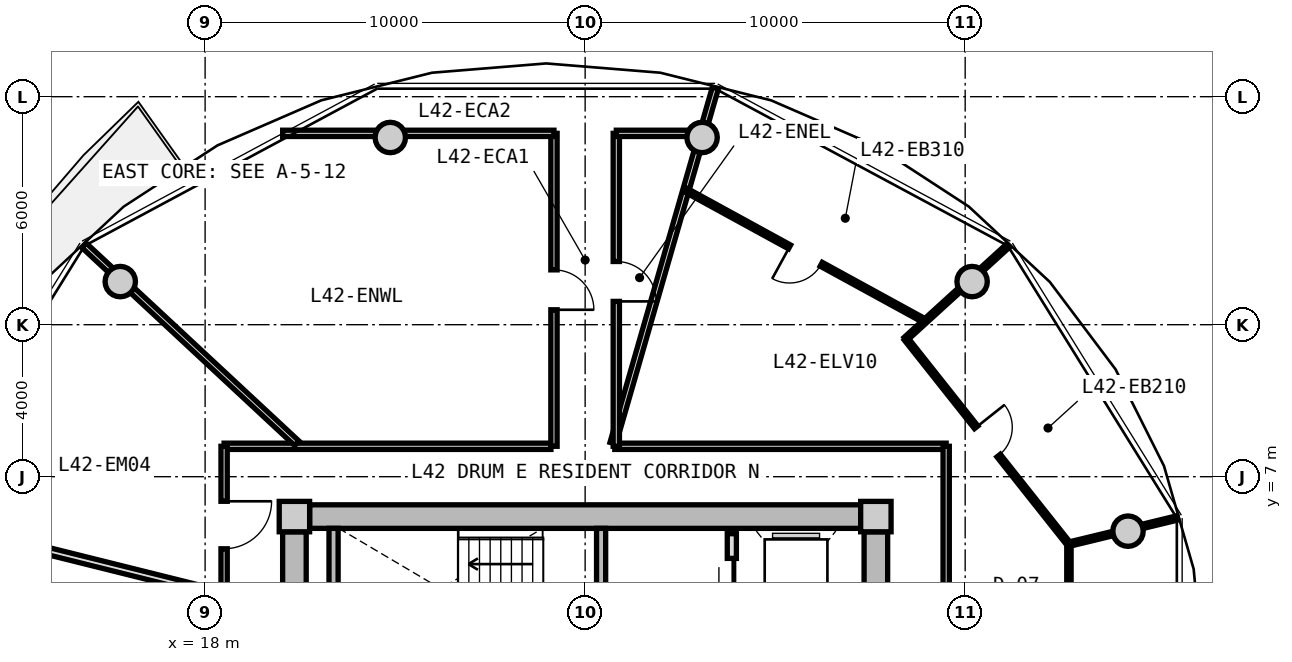
"""IFC4 building model, lengths in metres.
Left out: names, types, materials, properties, quantities, classifications, styles, units other than length and angle.
Written with IfcOpenShell. Run it as: python <this file> out.ifc"""

import sys

from ifc_helpers import new_model, si_unit, direction, frame, frame_2d, origin, origin_2d, place, context, subcontext, project, spatial, rectangle, circle, extrude, source, transform, mapped, element, fill, save


model = new_model("IFC4")
c1 = context("Model", 3, precision=1e-05, world=origin(), true_north=direction((0.0, 1.0)))
c2 = subcontext(c1, "Body", "Model", "MODEL_VIEW")
j1 = project(units=[si_unit("LENGTHUNIT", "METRE"), si_unit("PLANEANGLEUNIT", "RADIAN")], contexts=[c1])
p1 = place(None, origin())
s1 = spatial("IfcSite", under=j1, at=p1, CompositionType="ELEMENT")
p2 = place(p1, origin())
s2 = spatial("IfcBuilding", under=s1, at=p2, CompositionType="ELEMENT")
p3 = place(p2, frame((0.0, 0.0, 137.35)))
s3 = spatial("IfcBuildingStorey", under=s2, at=p3, CompositionType="ELEMENT", Elevation=137.35)
m1 = source(origin(), c2, "Body", "SweptSolid", [
    extrude(rectangle(XDim=0.8, YDim=0.8, at=origin_2d()), origin(), (0.0, 0.0, 1.0), 3.05),
])
for number, where, z_axis, x_axis in (
    (1, (35.65, 5.95, 0.0), (0.0, 0.0, 1.0), (1.0, 0.0, 0.0)),
    (2, (20.35, 5.95, 0.0), (0.0, 0.0, 1.0), (1.0, 0.0, 0.0)),
):
    element("IfcColumn", number, at=place(p3, frame(where, z_axis=z_axis, x_axis=x_axis)), inside=s3, PredefinedType="COLUMN", context=c2, shape_type="MappedRepresentation", body=[
        mapped(m1, transform((0.0, 0.0, 0.0), x_axis=(1.0, 0.0, 0.0), y_axis=(0.0, 1.0, 0.0), z_axis=(0.0, 0.0, 1.0), scale=1.0)),
    ])
m2 = source(origin(), c2, "Body", "SweptSolid", [
    extrude(rectangle(XDim=14.5, YDim=0.62, at=frame_2d((7.25, 0.0))), origin(), (0.0, 0.0, 1.0), 2.81),
])
p4 = place(p3, frame((20.75, 5.95, 0.0), z_axis=(0.0, 0.0, 1.0), x_axis=(1.0, 0.0, 0.0)))
e3 = element("IfcWall", 3, at=p4, inside=s3, PredefinedType="SHEAR", context=c2, shape_type="MappedRepresentation", body=[
    mapped(m2, transform((0.0, 0.0, 0.0), x_axis=(1.0, 0.0, 0.0), y_axis=(0.0, 1.0, 0.0), z_axis=(0.0, 0.0, 1.0), scale=1.0)),
])
m3 = source(origin(), c2, "Body", "SweptSolid", [
    extrude(rectangle(XDim=11.1, YDim=0.62, at=frame_2d((5.55, 0.0))), origin(), (0.0, 0.0, 1.0), 2.81),
])
p5 = place(p3, frame((20.35, -5.55, 0.0), z_axis=(0.0, 0.0, 1.0), x_axis=(0.0, 1.0, 0.0)))
e4 = element("IfcWall", 4, at=p5, inside=s3, PredefinedType="SHEAR", context=c2, shape_type="MappedRepresentation", body=[
    mapped(m3, transform((0.0, 0.0, 0.0), x_axis=(1.0, 0.0, 0.0), y_axis=(0.0, 1.0, 0.0), z_axis=(0.0, 0.0, 1.0), scale=1.0)),
])
p6 = place(p5, frame((3.8, 0.0, 0.0)))
e5 = element("IfcOpeningElement", 5, at=p6, cuts=e4, PredefinedType="OPENING", context=c2, shape_type="SweptSolid", body=[
    extrude(rectangle(XDim=1.2, YDim=2.15, at=frame_2d((0.6, 1.075))), frame((0.0, 0.32, 0.0), z_axis=(0.0, -1.0, 0.0), x_axis=(1.0, 0.0, 0.0)), (0.0, 0.0, 1.0), 0.64),
])
p7 = place(p3, frame((35.65, 5.55, 0.0), z_axis=(0.0, 0.0, 1.0), x_axis=(0.0, -1.0, 0.0)))
e6 = element("IfcWall", 6, at=p7, inside=s3, PredefinedType="SHEAR", context=c2, shape_type="MappedRepresentation", body=[
    mapped(m3, transform((0.0, 0.0, 0.0), x_axis=(1.0, 0.0, 0.0), y_axis=(0.0, 1.0, 0.0), z_axis=(0.0, 0.0, 1.0), scale=1.0)),
])
p8 = place(p7, frame((5.65, 0.0, 0.0)))
e7 = element("IfcOpeningElement", 7, at=p8, cuts=e6, PredefinedType="OPENING", context=c2, shape_type="SweptSolid", body=[
    extrude(rectangle(XDim=1.2, YDim=2.15, at=frame_2d((0.6, 1.075))), frame((0.0, 0.32, 0.0), z_axis=(0.0, -1.0, 0.0), x_axis=(1.0, 0.0, 0.0)), (0.0, 0.0, 1.0), 0.64),
])
m4 = source(origin(), c2, "Body", "SweptSolid", [
    extrude(circle(Radius=0.4, at=origin_2d()), origin(), (0.0, 0.0, 1.0), 3.05),
])
for number, where, z_axis, x_axis in (
    (8, (42.285, 5.567, 0.0), (0.0, 0.0, 1.0), (1.0, 0.0, 0.0)),
    (9, (38.183, 12.135, 0.0), (0.0, 0.0, 1.0), (1.0, 0.0, 0.0)),
    (10, (31.077, 15.926, 0.0), (0.0, 0.0, 1.0), (1.0, 0.0, 0.0)),
    (11, (22.873, 15.926, 0.0), (0.0, 0.0, 1.0), (1.0, 0.0, 0.0)),
    (12, (15.767, 12.135, 0.0), (0.0, 0.0, 1.0), (1.0, 0.0, 0.0)),
):
    element("IfcColumn", number, at=place(p3, frame(where, z_axis=z_axis, x_axis=x_axis)), inside=s3, PredefinedType="COLUMN", context=c2, shape_type="MappedRepresentation", body=[
        mapped(m4, transform((0.0, 0.0, 0.0), x_axis=(1.0, 0.0, 0.0), y_axis=(0.0, 1.0, 0.0), z_axis=(0.0, 0.0, 1.0), scale=1.0)),
    ])
m5 = source(origin(), c2, "Body", "SweptSolid", [
    extrude(rectangle(XDim=3.19, YDim=0.24, at=frame_2d((1.595, 0.0))), origin(), (0.0, 0.0, 1.0), 2.81),
])
p9 = place(p3, frame((21.38, 2.45, 0.0), z_axis=(0.0, 0.0, 1.0), x_axis=(0.0, 1.0, 0.0)))
e13 = element("IfcWall", 13, at=p9, inside=s3, PredefinedType="PARTITIONING", context=c2, shape_type="MappedRepresentation", body=[
    mapped(m5, transform((0.0, 0.0, 0.0), x_axis=(1.0, 0.0, 0.0), y_axis=(0.0, 1.0, 0.0), z_axis=(0.0, 0.0, 1.0), scale=1.0)),
])
p10 = place(p3, frame((28.42, 2.45, 0.0), z_axis=(0.0, 0.0, 1.0), x_axis=(0.0, 1.0, 0.0)))
e14 = element("IfcWall", 14, at=p10, inside=s3, PredefinedType="PARTITIONING", context=c2, shape_type="MappedRepresentation", body=[
    mapped(m5, transform((0.0, 0.0, 0.0), x_axis=(1.0, 0.0, 0.0), y_axis=(0.0, 1.0, 0.0), z_axis=(0.0, 0.0, 1.0), scale=1.0)),
])
p11 = place(p10, frame((0.55, 0.0, 0.0)))
e15 = element("IfcOpeningElement", 15, at=p11, cuts=e14, PredefinedType="OPENING", context=c2, shape_type="SweptSolid", body=[
    extrude(rectangle(XDim=1.1, YDim=2.15, at=frame_2d((0.55, 1.075))), frame((0.0, 0.13, 0.0), z_axis=(0.0, -1.0, 0.0), x_axis=(1.0, 0.0, 0.0)), (0.0, 0.0, 1.0), 0.26),
])
m6 = source(origin(), c2, "Body", "SweptSolid", [
    extrude(rectangle(XDim=5.0, YDim=0.24, at=frame_2d((2.5, 0.0))), origin(), (0.0, 0.0, 1.0), 2.795),
])
p12 = place(p3, frame((31.86, 0.5, 0.0), z_axis=(0.0, 0.0, 1.0), x_axis=(0.0, 1.0, 0.0)))
e16 = element("IfcWall", 16, at=p12, inside=s3, PredefinedType="PARTITIONING", context=c2, shape_type="MappedRepresentation", body=[
    mapped(m6, transform((0.0, 0.0, 0.0), x_axis=(1.0, 0.0, 0.0), y_axis=(0.0, 1.0, 0.0), z_axis=(0.0, 0.0, 1.0), scale=1.0)),
])
p13 = place(p12, frame((3.05, 0.0, 0.0)))
e17 = element("IfcOpeningElement", 17, at=p13, cuts=e16, PredefinedType="OPENING", context=c2, shape_type="SweptSolid", body=[
    extrude(rectangle(XDim=1.3, YDim=2.2, at=frame_2d((0.65, 1.1))), frame((0.0, 0.13, 0.0), z_axis=(0.0, -1.0, 0.0), x_axis=(1.0, 0.0, 0.0)), (0.0, 0.0, 1.0), 0.26),
])
p14 = place(p12, frame((0.55, 0.0, 0.0)))
e18 = element("IfcOpeningElement", 18, at=p14, cuts=e16, PredefinedType="OPENING", context=c2, shape_type="SweptSolid", body=[
    extrude(rectangle(XDim=1.3, YDim=2.2, at=frame_2d((0.65, 1.1))), frame((0.0, 0.13, 0.0), z_axis=(0.0, -1.0, 0.0), x_axis=(1.0, 0.0, 0.0)), (0.0, 0.0, 1.0), 0.26),
])
m7 = source(origin(), c2, "Body", "SweptSolid", [
    extrude(rectangle(XDim=8.6, YDim=0.165, at=frame_2d((4.3, 0.0))), origin(), (0.0, 0.0, 1.0), 2.795),
])
p15 = place(p3, frame((18.5, 7.8, 0.0), z_axis=(0.0, 0.0, 1.0), x_axis=(1.0, 0.0, 0.0)))
e19 = element("IfcWall", 19, at=p15, inside=s3, PredefinedType="PARTITIONING", context=c2, shape_type="MappedRepresentation", body=[
    mapped(m7, transform((0.0, 0.0, 0.0), x_axis=(1.0, 0.0, 0.0), y_axis=(0.0, 1.0, 0.0), z_axis=(0.0, 0.0, 1.0), scale=1.0)),
])
m8 = source(origin(), c2, "Body", "SweptSolid", [
    extrude(rectangle(XDim=8.719, YDim=0.165, at=frame_2d((4.36, 0.0))), origin(), (0.0, 0.0, 1.0), 2.795),
])
p16 = place(p3, frame((28.781, 7.8, 0.0), z_axis=(0.0, 0.0, 1.0), x_axis=(1.0, 0.0, 0.0)))
e20 = element("IfcWall", 20, at=p16, inside=s3, PredefinedType="PARTITIONING", context=c2, shape_type="MappedRepresentation", body=[
    mapped(m8, transform((0.0, 0.0, 0.0), x_axis=(1.0, 0.0, 0.0), y_axis=(0.0, 1.0, 0.0), z_axis=(0.0, 0.0, 1.0), scale=1.0)),
])
m9 = source(origin(), c2, "Body", "SweptSolid", [
    extrude(rectangle(XDim=15.6, YDim=0.165, at=frame_2d((7.8, 0.0))), origin(), (0.0, 0.0, 1.0), 2.795),
])
p17 = place(p3, frame((18.5, -7.8, 0.0), z_axis=(0.0, 0.0, 1.0), x_axis=(0.0, 1.0, 0.0)))
e21 = element("IfcWall", 21, at=p17, inside=s3, PredefinedType="PARTITIONING", context=c2, shape_type="MappedRepresentation", body=[
    mapped(m9, transform((0.0, 0.0, 0.0), x_axis=(1.0, 0.0, 0.0), y_axis=(0.0, 1.0, 0.0), z_axis=(0.0, 0.0, 1.0), scale=1.0)),
])
p18 = place(p17, frame((12.903, 0.0, 0.0)))
e22 = element("IfcOpeningElement", 22, at=p18, cuts=e21, PredefinedType="OPENING", context=c2, shape_type="SweptSolid", body=[
    extrude(rectangle(XDim=1.25, YDim=2.2, at=frame_2d((0.625, 1.1))), frame((0.0, 0.093, 0.0), z_axis=(0.0, -1.0, 0.0), x_axis=(1.0, 0.0, 0.0)), (0.0, 0.0, 1.0), 0.185),
])
p19 = place(p17, frame((8.95, 0.0, 0.0)))
e23 = element("IfcOpeningElement", 23, at=p19, cuts=e21, PredefinedType="OPENING", context=c2, shape_type="SweptSolid", body=[
    extrude(rectangle(XDim=1.25, YDim=2.2, at=frame_2d((0.625, 1.1))), frame((0.0, 0.093, 0.0), z_axis=(0.0, -1.0, 0.0), x_axis=(1.0, 0.0, 0.0)), (0.0, 0.0, 1.0), 0.185),
])
p20 = place(p3, frame((37.5, 7.8, 0.0), z_axis=(0.0, 0.0, 1.0), x_axis=(0.0, -1.0, 0.0)))
e24 = element("IfcWall", 24, at=p20, inside=s3, PredefinedType="PARTITIONING", context=c2, shape_type="MappedRepresentation", body=[
    mapped(m9, transform((0.0, 0.0, 0.0), x_axis=(1.0, 0.0, 0.0), y_axis=(0.0, 1.0, 0.0), z_axis=(0.0, 0.0, 1.0), scale=1.0)),
])
p21 = place(p20, frame((5.687, 0.0, 0.0)))
e25 = element("IfcOpeningElement", 25, at=p21, cuts=e24, PredefinedType="OPENING", context=c2, shape_type="SweptSolid", body=[
    extrude(rectangle(XDim=1.05, YDim=2.15, at=frame_2d((0.525, 1.075))), frame((0.0, 0.093, 0.0), z_axis=(0.0, -1.0, 0.0), x_axis=(1.0, 0.0, 0.0)), (0.0, 0.0, 1.0), 0.185),
])
m10 = source(origin(), c2, "Body", "SweptSolid", [
    extrude(rectangle(XDim=9.73, YDim=0.165, at=frame_2d((4.865, 0.0))), origin(), (0.0, 0.0, 1.0), 2.345),
])
p22 = place(p3, frame((28.733, 7.88, 0.0), z_axis=(0.0, 0.0, 1.0), x_axis=(0.27679492614, 0.960929013436, 0.0)))
e26 = element("IfcWall", 26, at=p22, inside=s3, PredefinedType="PARTITIONING", context=c2, shape_type="MappedRepresentation", body=[
    mapped(m10, transform((0.0, 0.0, 0.0), x_axis=(1.0, 0.0, 0.0), y_axis=(0.0, 1.0, 0.0), z_axis=(0.0, 0.0, 1.0), scale=1.0)),
])
m11 = source(origin(), c2, "Body", "SweptSolid", [
    extrude(rectangle(XDim=7.648, YDim=0.165, at=frame_2d((3.824, 0.0))), origin(), (0.0, 0.0, 1.0), 2.345),
])
p23 = place(p3, frame((20.413, 7.88, 0.0), z_axis=(0.0, 0.0, 1.0), x_axis=(-0.732182665826, 0.681108320213, 0.0)))
e27 = element("IfcWall", 27, at=p23, inside=s3, PredefinedType="PARTITIONING", context=c2, shape_type="MappedRepresentation", body=[
    mapped(m11, transform((0.0, 0.0, 0.0), x_axis=(1.0, 0.0, 0.0), y_axis=(0.0, 1.0, 0.0), z_axis=(0.0, 0.0, 1.0), scale=1.0)),
])
m12 = source(origin(), c2, "Body", "SweptSolid", [
    extrude(rectangle(XDim=8.235, YDim=0.165, at=frame_2d((4.118, 0.0))), origin(), (0.0, 0.0, 1.0), 2.795),
])
p24 = place(p3, frame((27.18, 7.8, 0.0), z_axis=(0.0, 0.0, 1.0), x_axis=(0.0, 1.0, 0.0)))
e28 = element("IfcWall", 28, at=p24, inside=s3, PredefinedType="PARTITIONING", context=c2, shape_type="MappedRepresentation", body=[
    mapped(m12, transform((0.0, 0.0, 0.0), x_axis=(1.0, 0.0, 0.0), y_axis=(0.0, 1.0, 0.0), z_axis=(0.0, 0.0, 1.0), scale=1.0)),
])
p25 = place(p24, frame((3.593, 0.0, 0.0)))
e29 = element("IfcOpeningElement", 29, at=p25, cuts=e28, PredefinedType="OPENING", context=c2, shape_type="SweptSolid", body=[
    extrude(rectangle(XDim=1.05, YDim=2.15, at=frame_2d((0.525, 1.075))), frame((0.0, 0.093, 0.0), z_axis=(0.0, -1.0, 0.0), x_axis=(1.0, 0.0, 0.0)), (0.0, 0.0, 1.0), 0.185),
])
m13 = source(origin(), c2, "Body", "SweptSolid", [
    extrude(rectangle(XDim=7.139, YDim=0.165, at=frame_2d((3.569, 0.0))), origin(), (0.0, 0.0, 1.0), 2.345),
])
p26 = place(p3, frame((20.041, 16.035, 0.0), z_axis=(0.0, 0.0, 1.0), x_axis=(1.0, 0.0, 0.0)))
e30 = element("IfcWall", 30, at=p26, inside=s3, PredefinedType="PARTITIONING", context=c2, shape_type="MappedRepresentation", body=[
    mapped(m13, transform((0.0, 0.0, 0.0), x_axis=(1.0, 0.0, 0.0), y_axis=(0.0, 1.0, 0.0), z_axis=(0.0, 0.0, 1.0), scale=1.0)),
])
p27 = place(p3, frame((28.82, 7.8, 0.0), z_axis=(0.0, 0.0, 1.0), x_axis=(0.0, 1.0, 0.0)))
e31 = element("IfcWall", 31, at=p27, inside=s3, PredefinedType="PARTITIONING", context=c2, shape_type="MappedRepresentation", body=[
    mapped(m12, transform((0.0, 0.0, 0.0), x_axis=(1.0, 0.0, 0.0), y_axis=(0.0, 1.0, 0.0), z_axis=(0.0, 0.0, 1.0), scale=1.0)),
])
p28 = place(p27, frame((3.813, 0.0, 0.0)))
e32 = element("IfcOpeningElement", 32, at=p28, cuts=e31, PredefinedType="OPENING", context=c2, shape_type="SweptSolid", body=[
    extrude(rectangle(XDim=1.05, YDim=2.15, at=frame_2d((0.525, 1.075))), frame((0.0, 0.093, 0.0), z_axis=(0.0, -1.0, 0.0), x_axis=(1.0, 0.0, 0.0)), (0.0, 0.0, 1.0), 0.185),
])
m14 = source(origin(), c2, "Body", "SweptSolid", [
    extrude(rectangle(XDim=2.419, YDim=0.165, at=frame_2d((1.209, 0.0))), origin(), (0.0, 0.0, 1.0), 2.345),
])
p29 = place(p3, frame((28.82, 16.035, 0.0), z_axis=(0.0, 0.0, 1.0), x_axis=(1.0, 0.0, 0.0)))
e33 = element("IfcWall", 33, at=p29, inside=s3, PredefinedType="PARTITIONING", context=c2, shape_type="MappedRepresentation", body=[
    mapped(m14, transform((0.0, 0.0, 0.0), x_axis=(1.0, 0.0, 0.0), y_axis=(0.0, 1.0, 0.0), z_axis=(0.0, 0.0, 1.0), scale=1.0)),
])
m15 = source(origin(), c2, "Body", "SweptSolid", [
    extrude(rectangle(XDim=8.305, YDim=0.19, at=frame_2d((4.153, 0.0))), origin(), (0.0, 0.0, 1.0), 2.345),
])
p30 = place(p3, frame((18.42, 3.908, 0.0), z_axis=(0.0, 0.0, 1.0), x_axis=(-0.970309994378, 0.241864662175, 0.0)))
e34 = element("IfcWall", 34, at=p30, inside=s3, PredefinedType="PARTITIONING", context=c2, shape_type="MappedRepresentation", body=[
    mapped(m15, transform((0.0, 0.0, 0.0), x_axis=(1.0, 0.0, 0.0), y_axis=(0.0, 1.0, 0.0), z_axis=(0.0, 0.0, 1.0), scale=1.0)),
])
m16 = source(origin(), c2, "Body", "SweptSolid", [
    extrude(rectangle(XDim=6.897, YDim=0.115, at=frame_2d((3.448, 0.0))), origin(), (0.0, 0.0, 1.0), 2.795),
])
p31 = place(p3, frame((40.73, -1.673, 0.0), z_axis=(0.0, 0.0, 1.0), x_axis=(0.0, 1.0, 0.0)))
e35 = element("IfcWall", 35, at=p31, inside=s3, PredefinedType="PARTITIONING", context=c2, shape_type="MappedRepresentation", body=[
    mapped(m16, transform((0.0, 0.0, 0.0), x_axis=(1.0, 0.0, 0.0), y_axis=(0.0, 1.0, 0.0), z_axis=(0.0, 0.0, 1.0), scale=1.0)),
])
p32 = place(p31, frame((2.973, 0.0, 0.0)))
e36 = element("IfcOpeningElement", 36, at=p32, cuts=e35, PredefinedType="OPENING", context=c2, shape_type="SweptSolid", body=[
    extrude(rectangle(XDim=0.95, YDim=2.1, at=frame_2d((0.475, 1.05))), frame((0.0, 0.067, 0.0), z_axis=(0.0, -1.0, 0.0), x_axis=(1.0, 0.0, 0.0)), (0.0, 0.0, 1.0), 0.135),
])
m17 = source(origin(), c2, "Body", "SweptSolid", [
    extrude(rectangle(XDim=6.902, YDim=0.115, at=frame_2d((3.451, 0.0))), origin(), (0.0, 0.0, 1.0), 2.795),
])
p33 = place(p3, frame((40.729, 5.223, 0.0), z_axis=(0.0, 0.0, 1.0), x_axis=(-0.62123371778, 0.783625336429, 0.0)))
e37 = element("IfcWall", 37, at=p33, inside=s3, PredefinedType="PARTITIONING", context=c2, shape_type="MappedRepresentation", body=[
    mapped(m17, transform((0.0, 0.0, 0.0), x_axis=(1.0, 0.0, 0.0), y_axis=(0.0, 1.0, 0.0), z_axis=(0.0, 0.0, 1.0), scale=1.0)),
])
p34 = place(p33, frame((2.976, 0.0, 0.0)))
e38 = element("IfcOpeningElement", 38, at=p34, cuts=e37, PredefinedType="OPENING", context=c2, shape_type="SweptSolid", body=[
    extrude(rectangle(XDim=0.95, YDim=2.1, at=frame_2d((0.475, 1.05))), frame((0.0, 0.067, 0.0), z_axis=(0.0, -1.0, 0.0), x_axis=(1.0, 0.0, 0.0)), (0.0, 0.0, 1.0), 0.135),
])
m18 = source(origin(), c2, "Body", "SweptSolid", [
    extrude(rectangle(XDim=2.943, YDim=0.115, at=frame_2d((1.471, 0.0))), origin(), (0.0, 0.0, 1.0), 2.345),
])
p35 = place(p3, frame((40.729, 5.223, 0.0), z_axis=(0.0, 0.0, 1.0), x_axis=(0.971864495214, 0.235540660911, 0.0)))
e39 = element("IfcWall", 39, at=p35, inside=s3, PredefinedType="PARTITIONING", context=c2, shape_type="MappedRepresentation", body=[
    mapped(m18, transform((0.0, 0.0, 0.0), x_axis=(1.0, 0.0, 0.0), y_axis=(0.0, 1.0, 0.0), z_axis=(0.0, 0.0, 1.0), scale=1.0)),
])
m19 = source(origin(), c2, "Body", "SweptSolid", [
    extrude(rectangle(XDim=7.167, YDim=0.115, at=frame_2d((3.583, 0.0))), origin(), (0.0, 0.0, 1.0), 2.795),
])
p36 = place(p3, frame((36.939, 11.098, 0.0), z_axis=(0.0, 0.0, 1.0), x_axis=(-0.8771628907, 0.480192943699, 0.0)))
e40 = element("IfcWall", 40, at=p36, inside=s3, PredefinedType="PARTITIONING", context=c2, shape_type="MappedRepresentation", body=[
    mapped(m19, transform((0.0, 0.0, 0.0), x_axis=(1.0, 0.0, 0.0), y_axis=(0.0, 1.0, 0.0), z_axis=(0.0, 0.0, 1.0), scale=1.0)),
])
p37 = place(p36, frame((3.108, 0.0, 0.0)))
e41 = element("IfcOpeningElement", 41, at=p37, cuts=e40, PredefinedType="OPENING", context=c2, shape_type="SweptSolid", body=[
    extrude(rectangle(XDim=0.95, YDim=2.1, at=frame_2d((0.475, 1.05))), frame((0.0, 0.067, 0.0), z_axis=(0.0, -1.0, 0.0), x_axis=(1.0, 0.0, 0.0)), (0.0, 0.0, 1.0), 0.135),
])
m20 = source(origin(), c2, "Body", "SweptSolid", [
    extrude(rectangle(XDim=3.66, YDim=0.115, at=frame_2d((1.83, 0.0))), origin(), (0.0, 0.0, 1.0), 2.345),
])
p38 = place(p3, frame((36.432, 10.624, 0.0), z_axis=(0.0, 0.0, 1.0), x_axis=(0.73909744987, 0.673598515137, 0.0)))
e42 = element("IfcWall", 42, at=p38, inside=s3, PredefinedType="PARTITIONING", context=c2, shape_type="MappedRepresentation", body=[
    mapped(m20, transform((0.0, 0.0, 0.0), x_axis=(1.0, 0.0, 0.0), y_axis=(0.0, 1.0, 0.0), z_axis=(0.0, 0.0, 1.0), scale=1.0)),
])
m21 = source(origin(), c2, "Body", "SweptSolid", [
    extrude(rectangle(XDim=1.3, YDim=2.2, at=frame_2d((0.65, 1.1))), frame((0.0, 0.025, 0.0), z_axis=(0.0, -1.0, 0.0), x_axis=(1.0, 0.0, 0.0)), (0.0, 0.0, 1.0), 0.05),
])
p39 = place(p13, origin())
e43 = element("IfcDoor", 43, at=p39, inside=s3, OperationType="SLIDING_TO_LEFT", PredefinedType="DOOR", context=c2, shape_type="MappedRepresentation", body=[
    mapped(m21, transform((0.0, 0.0, 0.0), x_axis=(1.0, 0.0, 0.0), y_axis=(0.0, 1.0, 0.0), z_axis=(0.0, 0.0, 1.0), scale=1.0)),
])
fill(e17, e43)
m22 = source(origin(), c2, "Body", "SweptSolid", [
    extrude(rectangle(XDim=1.05, YDim=2.15, at=frame_2d((0.525, 1.075))), frame((0.0, 0.025, 0.0), z_axis=(0.0, -1.0, 0.0), x_axis=(1.0, 0.0, 0.0)), (0.0, 0.0, 1.0), 0.05),
])
p40 = place(p25, frame((1.05, 0.0, 0.0), z_axis=(0.0, 0.0, 1.0), x_axis=(-1.0, 0.0, 0.0)))
e44 = element("IfcDoor", 44, at=p40, inside=s3, OperationType="SINGLE_SWING_RIGHT", PredefinedType="DOOR", context=c2, shape_type="MappedRepresentation", body=[
    mapped(m22, transform((0.0, 0.0, 0.0), x_axis=(1.0, 0.0, 0.0), y_axis=(0.0, 1.0, 0.0), z_axis=(0.0, 0.0, 1.0), scale=1.0)),
])
fill(e29, e44)
p41 = place(p28, frame((1.05, 0.0, 0.0), z_axis=(0.0, 0.0, 1.0), x_axis=(-1.0, 0.0, 0.0)))
e45 = element("IfcDoor", 45, at=p41, inside=s3, OperationType="SINGLE_SWING_RIGHT", PredefinedType="DOOR", context=c2, shape_type="MappedRepresentation", body=[
    mapped(m22, transform((0.0, 0.0, 0.0), x_axis=(1.0, 0.0, 0.0), y_axis=(0.0, 1.0, 0.0), z_axis=(0.0, 0.0, 1.0), scale=1.0)),
])
fill(e32, e45)
m23 = source(origin(), c2, "Body", "SweptSolid", [
    extrude(rectangle(XDim=1.25, YDim=2.2, at=frame_2d((0.625, 1.1))), frame((0.0, 0.025, 0.0), z_axis=(0.0, -1.0, 0.0), x_axis=(1.0, 0.0, 0.0)), (0.0, 0.0, 1.0), 0.05),
])
p42 = place(p18, frame((1.25, 0.0, 0.0), z_axis=(0.0, 0.0, 1.0), x_axis=(-1.0, 0.0, 0.0)))
e46 = element("IfcDoor", 46, at=p42, inside=s3, OperationType="SINGLE_SWING_LEFT", PredefinedType="DOOR", context=c2, shape_type="MappedRepresentation", body=[
    mapped(m23, transform((0.0, 0.0, 0.0), x_axis=(1.0, 0.0, 0.0), y_axis=(0.0, 1.0, 0.0), z_axis=(0.0, 0.0, 1.0), scale=1.0)),
])
fill(e22, e46)
m24 = source(origin(), c2, "Body", "SweptSolid", [
    extrude(rectangle(XDim=0.95, YDim=2.1, at=frame_2d((0.475, 1.05))), frame((0.0, 0.025, 0.0), z_axis=(0.0, -1.0, 0.0), x_axis=(1.0, 0.0, 0.0)), (0.0, 0.0, 1.0), 0.05),
])
p43 = place(p34, frame((0.95, 0.0, 0.0), z_axis=(0.0, 0.0, 1.0), x_axis=(-1.0, 0.0, 0.0)))
e47 = element("IfcDoor", 47, at=p43, inside=s3, OperationType="SINGLE_SWING_LEFT", PredefinedType="DOOR", context=c2, shape_type="MappedRepresentation", body=[
    mapped(m24, transform((0.0, 0.0, 0.0), x_axis=(1.0, 0.0, 0.0), y_axis=(0.0, 1.0, 0.0), z_axis=(0.0, 0.0, 1.0), scale=1.0)),
])
fill(e38, e47)
p44 = place(p37, origin())
e48 = element("IfcDoor", 48, at=p44, inside=s3, OperationType="SINGLE_SWING_RIGHT", PredefinedType="DOOR", context=c2, shape_type="MappedRepresentation", body=[
    mapped(m24, transform((0.0, 0.0, 0.0), x_axis=(1.0, 0.0, 0.0), y_axis=(0.0, 1.0, 0.0), z_axis=(0.0, 0.0, 1.0), scale=1.0)),
])
fill(e41, e48)
save(model, sys.argv[1])
